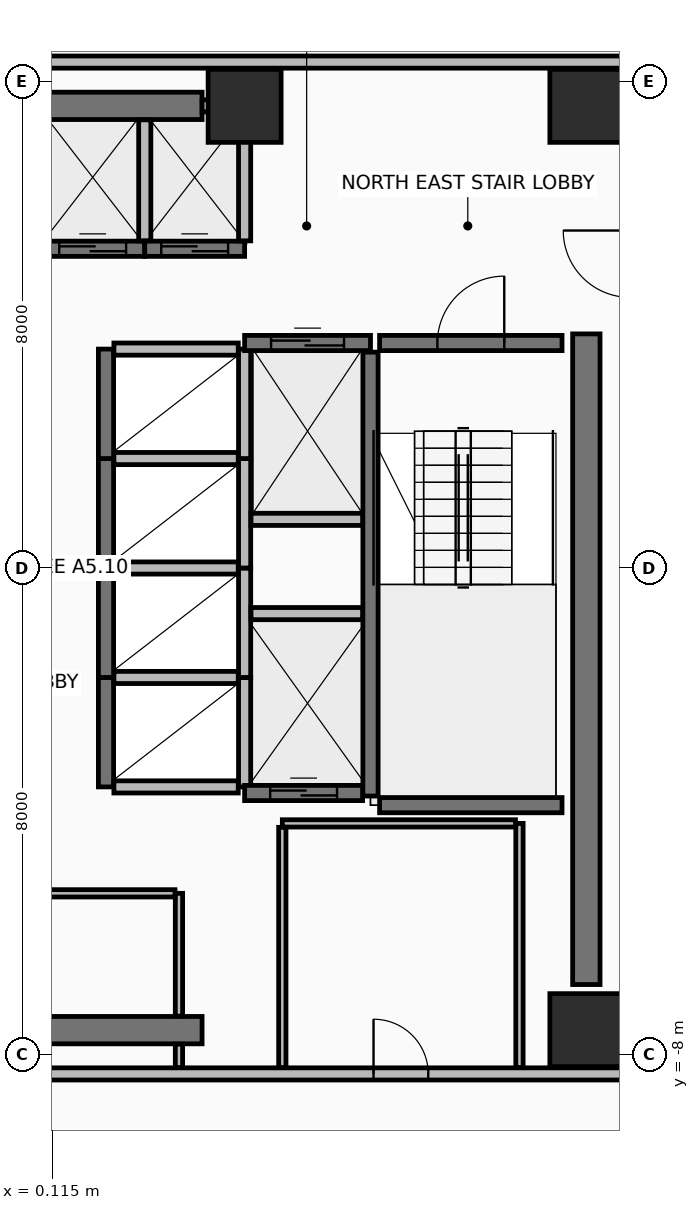
"""IFC4 building model, lengths in metres.
Left out: names, types, materials, properties, quantities, classifications, styles, units other than length and angle.
Written with IfcOpenShell. Run it as: python <this file> out.ifc"""

import sys

from ifc_helpers import new_model, si_unit, direction, frame, frame_2d, origin, origin_2d, place, context, subcontext, project, spatial, rectangle, extrude, element, fill, save


model = new_model("IFC4")
c1 = context("Model", 3, precision=1e-05, world=origin(), true_north=direction((0.0, 1.0)))
c2 = subcontext(c1, "Body", "Model", "MODEL_VIEW")
j1 = project(units=[si_unit("LENGTHUNIT", "METRE"), si_unit("PLANEANGLEUNIT", "RADIAN")], contexts=[c1])
p1 = place(None, origin())
s1 = spatial("IfcSite", under=j1, at=p1, CompositionType="ELEMENT")
p2 = place(p1, origin())
s2 = spatial("IfcBuilding", under=s1, at=p2, CompositionType="ELEMENT")
p3 = place(p2, frame((0.0, 0.0, 200.45)))
s3 = spatial("IfcBuildingStorey", under=s2, at=p3, CompositionType="ELEMENT", Elevation=200.45)
for number, where, z_axis, x_axis in (
    (1, (8.9, -7.6, 0.0), (0.0, 0.0, 1.0), (1.0, 0.0, 0.0)),
    (2, (8.9, 7.6, 0.0), (0.0, 0.0, 1.0), (1.0, 0.0, 0.0)),
    (3, (3.28, 7.6, 0.0), (0.0, 0.0, 1.0), (1.0, 0.0, 0.0)),
):
    element("IfcColumn", number, at=place(p3, frame(where, z_axis=z_axis, x_axis=x_axis)), inside=s3, PredefinedType="COLUMN", context=c2, shape_type="SweptSolid", body=[
        extrude(rectangle(XDim=1.2, YDim=1.2, at=origin_2d()), origin(), (0.0, 0.0, 1.0), 3.6),
    ])
for number, where, z_axis, x_axis in (
    (4, (-2.8, -7.6, 0.0), (0.0, 0.0, 1.0), (1.0, 0.0, 0.0)),
    (5, (-2.8, 7.6, 0.0), (0.0, 0.0, 1.0), (1.0, 0.0, 0.0)),
):
    element("IfcWall", number, at=place(p3, frame(where, z_axis=z_axis, x_axis=x_axis)), inside=s3, PredefinedType="SHEAR", context=c2, shape_type="SweptSolid", body=[
        extrude(rectangle(XDim=5.38, YDim=0.45, at=frame_2d((2.69, 0.0))), origin(), (0.0, 0.0, 1.0), 3.42),
    ])
p4 = place(p3, frame((8.9, -6.85, 0.0), z_axis=(0.0, 0.0, 1.0), x_axis=(0.0, 1.0, 0.0)))
e6 = element("IfcWall", 6, at=p4, inside=s3, PredefinedType="SHEAR", context=c2, shape_type="SweptSolid", body=[
    extrude(rectangle(XDim=10.7, YDim=0.45, at=frame_2d((5.35, 0.0))), origin(), (0.0, 0.0, 1.0), 3.42),
])
p5 = place(p3, frame((-9.62, -8.32, 0.0), z_axis=(0.0, 0.0, 1.0), x_axis=(1.0, 0.0, 0.0)))
e7 = element("IfcWall", 7, at=p5, inside=s3, PredefinedType="PARTITIONING", context=c2, shape_type="SweptSolid", body=[
    extrude(rectangle(XDim=19.24, YDim=0.2, at=frame_2d((9.62, 0.0))), origin(), (0.0, 0.0, 1.0), 2.865),
])
p6 = place(p5, frame((8.57, 0.0, 0.0)))
e8 = element("IfcOpeningElement", 8, at=p6, cuts=e7, PredefinedType="OPENING", context=c2, shape_type="SweptSolid", body=[
    extrude(rectangle(XDim=0.9, YDim=2.1, at=frame_2d((0.45, 1.05))), frame((0.0, 0.11, 0.0), z_axis=(0.0, -1.0, 0.0), x_axis=(1.0, 0.0, 0.0)), (0.0, 0.0, 1.0), 0.22),
])
p7 = place(p5, frame((15.02, 0.0, 0.0)))
e9 = element("IfcOpeningElement", 9, at=p7, cuts=e7, PredefinedType="OPENING", context=c2, shape_type="SweptSolid", body=[
    extrude(rectangle(XDim=0.9, YDim=2.1, at=frame_2d((0.45, 1.05))), frame((0.0, 0.11, 0.0), z_axis=(0.0, -1.0, 0.0), x_axis=(1.0, 0.0, 0.0)), (0.0, 0.0, 1.0), 0.22),
])
p8 = place(p3, frame((9.62, 8.32, 0.0), z_axis=(0.0, 0.0, 1.0), x_axis=(-1.0, 0.0, 0.0)))
e10 = element("IfcWall", 10, at=p8, inside=s3, PredefinedType="PARTITIONING", context=c2, shape_type="SweptSolid", body=[
    extrude(rectangle(XDim=19.24, YDim=0.2, at=frame_2d((9.62, 0.0))), origin(), (0.0, 0.0, 1.0), 2.865),
])
p9 = place(p8, frame((14.22, 0.0, 0.0)))
e11 = element("IfcOpeningElement", 11, at=p9, cuts=e10, PredefinedType="OPENING", context=c2, shape_type="SweptSolid", body=[
    extrude(rectangle(XDim=0.9, YDim=2.1, at=frame_2d((0.45, 1.05))), frame((0.0, 0.11, 0.0), z_axis=(0.0, -1.0, 0.0), x_axis=(1.0, 0.0, 0.0)), (0.0, 0.0, 1.0), 0.22),
])
p10 = place(p3, frame((5.35, -3.75, 0.0), z_axis=(0.0, 0.0, 1.0), x_axis=(0.0, 1.0, 0.0)))
e12 = element("IfcWall", 12, at=p10, inside=s3, PredefinedType="SHEAR", context=c2, shape_type="SweptSolid", body=[
    extrude(rectangle(XDim=7.3, YDim=0.25, at=frame_2d((3.65, 0.0))), origin(), (0.0, 0.0, 1.0), 3.42),
])
p11 = place(p3, frame((5.5, 3.7, 0.0), z_axis=(0.0, 0.0, 1.0), x_axis=(1.0, 0.0, 0.0)))
e13 = element("IfcWall", 13, at=p11, inside=s3, PredefinedType="SHEAR", context=c2, shape_type="SweptSolid", body=[
    extrude(rectangle(XDim=3.0, YDim=0.25, at=frame_2d((1.5, 0.0))), origin(), (0.0, 0.0, 1.0), 3.42),
])
p12 = place(p11, frame((0.95, 0.0, 0.0)))
e14 = element("IfcOpeningElement", 14, at=p12, cuts=e13, PredefinedType="OPENING", context=c2, shape_type="SweptSolid", body=[
    extrude(rectangle(XDim=1.1, YDim=2.15, at=frame_2d((0.55, 1.075))), frame((0.0, 0.135, 0.0), z_axis=(0.0, -1.0, 0.0), x_axis=(1.0, 0.0, 0.0)), (0.0, 0.0, 1.0), 0.27),
])
p13 = place(p3, frame((5.5, -3.9, 0.0), z_axis=(0.0, 0.0, 1.0), x_axis=(1.0, 0.0, 0.0)))
e15 = element("IfcWall", 15, at=p13, inside=s3, PredefinedType="SHEAR", context=c2, shape_type="SweptSolid", body=[
    extrude(rectangle(XDim=3.0, YDim=0.25, at=frame_2d((1.5, 0.0))), origin(), (0.0, 0.0, 1.0), 3.42),
])
p14 = place(p3, frame((-0.075, 5.25, 0.0), z_axis=(0.0, 0.0, 1.0), x_axis=(1.0, 0.0, 0.0)))
e16 = element("IfcWall", 16, at=p14, inside=s3, PredefinedType="SHEAR", context=c2, shape_type="SweptSolid", body=[
    extrude(rectangle(XDim=1.712, YDim=0.25, at=frame_2d((0.856, 0.0))), origin(), (0.0, 0.0, 1.0), 3.42),
])
p15 = place(p14, frame((0.306, 0.0, 0.0)))
e17 = element("IfcOpeningElement", 17, at=p15, cuts=e16, PredefinedType="OPENING", context=c2, shape_type="SweptSolid", body=[
    extrude(rectangle(XDim=1.1, YDim=2.2, at=frame_2d((0.55, 1.1))), frame((0.0, 0.135, 0.0), z_axis=(0.0, -1.0, 0.0), x_axis=(1.0, 0.0, 0.0)), (0.0, 0.0, 1.0), 0.27),
])
p16 = place(p3, frame((1.637, 5.38, 0.0), z_axis=(0.0, 0.0, 1.0), x_axis=(0.0, 1.0, 0.0)))
e18 = element("IfcWall", 18, at=p16, inside=s3, PredefinedType="PARTITIONING", context=c2, shape_type="SweptSolid", body=[
    extrude(rectangle(XDim=1.99, YDim=0.2, at=frame_2d((0.995, 0.0))), origin(), (0.0, 0.0, 1.0), 2.715),
])
p17 = place(p3, frame((1.637, 5.25, 0.0), z_axis=(0.0, 0.0, 1.0), x_axis=(1.0, 0.0, 0.0)))
e19 = element("IfcWall", 19, at=p17, inside=s3, PredefinedType="SHEAR", context=c2, shape_type="SweptSolid", body=[
    extrude(rectangle(XDim=1.643, YDim=0.25, at=frame_2d((0.821, 0.0))), origin(), (0.0, 0.0, 1.0), 3.42),
])
p18 = place(p17, frame((0.271, 0.0, 0.0)))
e20 = element("IfcOpeningElement", 20, at=p18, cuts=e19, PredefinedType="OPENING", context=c2, shape_type="SweptSolid", body=[
    extrude(rectangle(XDim=1.1, YDim=2.2, at=frame_2d((0.55, 1.1))), frame((0.0, 0.135, 0.0), z_axis=(0.0, -1.0, 0.0), x_axis=(1.0, 0.0, 0.0)), (0.0, 0.0, 1.0), 0.27),
])
p19 = place(p3, frame((2.58, 7.6, 0.0), z_axis=(0.0, 0.0, 1.0), x_axis=(1.0, 0.0, 0.0)))
e21 = element("IfcWall", 21, at=p19, inside=s3, PredefinedType="PARTITIONING", context=c2, shape_type="SweptSolid", body=[
    extrude(rectangle(XDim=0.7, YDim=0.2, at=frame_2d((0.35, 0.0))), origin(), (0.0, 0.0, 1.0), 2.715),
])
p20 = place(p3, frame((3.28, 5.38, 0.0), z_axis=(0.0, 0.0, 1.0), x_axis=(0.0, 1.0, 0.0)))
e22 = element("IfcWall", 22, at=p20, inside=s3, PredefinedType="PARTITIONING", context=c2, shape_type="SweptSolid", body=[
    extrude(rectangle(XDim=2.115, YDim=0.2, at=frame_2d((1.058, 0.0))), origin(), (0.0, 0.0, 1.0), 2.715),
])
p21 = place(p3, frame((1.0, -3.6, 0.0), z_axis=(0.0, 0.0, 1.0), x_axis=(0.0, 1.0, 0.0)))
e23 = element("IfcWall", 23, at=p21, inside=s3, PredefinedType="SHEAR", context=c2, shape_type="SweptSolid", body=[
    extrude(rectangle(XDim=1.8, YDim=0.25, at=frame_2d((0.9, 0.0))), origin(), (0.0, 0.0, 1.0), 3.42),
])
p22 = place(p3, frame((3.28, -3.6, 0.0), z_axis=(0.0, 0.0, 1.0), x_axis=(0.0, 1.0, 0.0)))
e24 = element("IfcWall", 24, at=p22, inside=s3, PredefinedType="PARTITIONING", context=c2, shape_type="SweptSolid", body=[
    extrude(rectangle(XDim=1.8, YDim=0.2, at=frame_2d((0.9, 0.0))), origin(), (0.0, 0.0, 1.0), 3.42),
])
for number, where, z_axis, x_axis in (
    (25, (1.13, -3.6, 0.0), (0.0, 0.0, 1.0), (1.0, 0.0, 0.0)),
    (26, (1.13, -1.8, 0.0), (0.0, 0.0, 1.0), (1.0, 0.0, 0.0)),
):
    element("IfcWall", number, at=place(p3, frame(where, z_axis=z_axis, x_axis=x_axis)), inside=s3, PredefinedType="PARTITIONING", context=c2, shape_type="SweptSolid", body=[
        extrude(rectangle(XDim=2.045, YDim=0.2, at=frame_2d((1.022, 0.0))), origin(), (0.0, 0.0, 1.0), 3.42),
    ])
p23 = place(p3, frame((1.0, -1.8, 0.0), z_axis=(0.0, 0.0, 1.0), x_axis=(0.0, 1.0, 0.0)))
e27 = element("IfcWall", 27, at=p23, inside=s3, PredefinedType="SHEAR", context=c2, shape_type="SweptSolid", body=[
    extrude(rectangle(XDim=1.8, YDim=0.25, at=frame_2d((0.9, 0.0))), origin(), (0.0, 0.0, 1.0), 3.42),
])
p24 = place(p3, frame((3.28, -1.8, 0.0), z_axis=(0.0, 0.0, 1.0), x_axis=(0.0, 1.0, 0.0)))
e28 = element("IfcWall", 28, at=p24, inside=s3, PredefinedType="PARTITIONING", context=c2, shape_type="SweptSolid", body=[
    extrude(rectangle(XDim=1.8, YDim=0.2, at=frame_2d((0.9, 0.0))), origin(), (0.0, 0.0, 1.0), 3.42),
])
p25 = place(p3, frame((1.13, 0.0, 0.0), z_axis=(0.0, 0.0, 1.0), x_axis=(1.0, 0.0, 0.0)))
e29 = element("IfcWall", 29, at=p25, inside=s3, PredefinedType="PARTITIONING", context=c2, shape_type="SweptSolid", body=[
    extrude(rectangle(XDim=2.045, YDim=0.2, at=frame_2d((1.022, 0.0))), origin(), (0.0, 0.0, 1.0), 3.42),
])
p26 = place(p3, frame((1.0, 0.0, 0.0), z_axis=(0.0, 0.0, 1.0), x_axis=(0.0, 1.0, 0.0)))
e30 = element("IfcWall", 30, at=p26, inside=s3, PredefinedType="SHEAR", context=c2, shape_type="SweptSolid", body=[
    extrude(rectangle(XDim=1.8, YDim=0.25, at=frame_2d((0.9, 0.0))), origin(), (0.0, 0.0, 1.0), 3.42),
])
p27 = place(p3, frame((3.28, 0.0, 0.0), z_axis=(0.0, 0.0, 1.0), x_axis=(0.0, 1.0, 0.0)))
e31 = element("IfcWall", 31, at=p27, inside=s3, PredefinedType="PARTITIONING", context=c2, shape_type="SweptSolid", body=[
    extrude(rectangle(XDim=1.8, YDim=0.2, at=frame_2d((0.9, 0.0))), origin(), (0.0, 0.0, 1.0), 3.42),
])
p28 = place(p3, frame((1.13, 1.8, 0.0), z_axis=(0.0, 0.0, 1.0), x_axis=(1.0, 0.0, 0.0)))
e32 = element("IfcWall", 32, at=p28, inside=s3, PredefinedType="PARTITIONING", context=c2, shape_type="SweptSolid", body=[
    extrude(rectangle(XDim=2.045, YDim=0.2, at=frame_2d((1.022, 0.0))), origin(), (0.0, 0.0, 1.0), 3.42),
])
p29 = place(p3, frame((1.0, 1.8, 0.0), z_axis=(0.0, 0.0, 1.0), x_axis=(0.0, 1.0, 0.0)))
e33 = element("IfcWall", 33, at=p29, inside=s3, PredefinedType="SHEAR", context=c2, shape_type="SweptSolid", body=[
    extrude(rectangle(XDim=1.8, YDim=0.25, at=frame_2d((0.9, 0.0))), origin(), (0.0, 0.0, 1.0), 3.42),
])
p30 = place(p3, frame((3.28, 1.8, 0.0), z_axis=(0.0, 0.0, 1.0), x_axis=(0.0, 1.0, 0.0)))
e34 = element("IfcWall", 34, at=p30, inside=s3, PredefinedType="PARTITIONING", context=c2, shape_type="SweptSolid", body=[
    extrude(rectangle(XDim=1.8, YDim=0.2, at=frame_2d((0.9, 0.0))), origin(), (0.0, 0.0, 1.0), 3.42),
])
p31 = place(p3, frame((1.13, 3.6, 0.0), z_axis=(0.0, 0.0, 1.0), x_axis=(1.0, 0.0, 0.0)))
e35 = element("IfcWall", 35, at=p31, inside=s3, PredefinedType="PARTITIONING", context=c2, shape_type="SweptSolid", body=[
    extrude(rectangle(XDim=2.045, YDim=0.2, at=frame_2d((1.022, 0.0))), origin(), (0.0, 0.0, 1.0), 2.715),
])
p32 = place(p3, frame((3.28, 3.7, 0.0), z_axis=(0.0, 0.0, 1.0), x_axis=(1.0, 0.0, 0.0)))
e36 = element("IfcWall", 36, at=p32, inside=s3, PredefinedType="SHEAR", context=c2, shape_type="SweptSolid", body=[
    extrude(rectangle(XDim=2.07, YDim=0.25, at=frame_2d((1.035, 0.0))), origin(), (0.0, 0.0, 1.0), 3.42),
])
p33 = place(p32, frame((0.435, 0.0, 0.0)))
e37 = element("IfcOpeningElement", 37, at=p33, cuts=e36, PredefinedType="OPENING", context=c2, shape_type="SweptSolid", body=[
    extrude(rectangle(XDim=1.2, YDim=2.2, at=frame_2d((0.6, 1.1))), frame((0.0, 0.135, 0.0), z_axis=(0.0, -1.0, 0.0), x_axis=(1.0, 0.0, 0.0)), (0.0, 0.0, 1.0), 0.27),
])
p34 = place(p3, frame((3.385, 0.8, 0.0), z_axis=(0.0, 0.0, 1.0), x_axis=(1.0, 0.0, 0.0)))
e38 = element("IfcWall", 38, at=p34, inside=s3, PredefinedType="PARTITIONING", context=c2, shape_type="SweptSolid", body=[
    extrude(rectangle(XDim=1.835, YDim=0.2, at=frame_2d((0.917, 0.0))), origin(), (0.0, 0.0, 1.0), 3.42),
])
p35 = place(p3, frame((3.28, -3.7, 0.0), z_axis=(0.0, 0.0, 1.0), x_axis=(1.0, 0.0, 0.0)))
e39 = element("IfcWall", 39, at=p35, inside=s3, PredefinedType="SHEAR", context=c2, shape_type="SweptSolid", body=[
    extrude(rectangle(XDim=1.94, YDim=0.25, at=frame_2d((0.97, 0.0))), origin(), (0.0, 0.0, 1.0), 3.42),
])
p36 = place(p35, frame((0.42, 0.0, 0.0)))
e40 = element("IfcOpeningElement", 40, at=p36, cuts=e39, PredefinedType="OPENING", context=c2, shape_type="SweptSolid", body=[
    extrude(rectangle(XDim=1.1, YDim=2.2, at=frame_2d((0.55, 1.1))), frame((0.0, 0.135, 0.0), z_axis=(0.0, -1.0, 0.0), x_axis=(1.0, 0.0, 0.0)), (0.0, 0.0, 1.0), 0.27),
])
p37 = place(p3, frame((3.385, -0.75, 0.0), z_axis=(0.0, 0.0, 1.0), x_axis=(1.0, 0.0, 0.0)))
e41 = element("IfcWall", 41, at=p37, inside=s3, PredefinedType="PARTITIONING", context=c2, shape_type="SweptSolid", body=[
    extrude(rectangle(XDim=1.835, YDim=0.2, at=frame_2d((0.917, 0.0))), origin(), (0.0, 0.0, 1.0), 3.42),
])
p38 = place(p3, frame((2.2, -8.215, 0.0), z_axis=(0.0, 0.0, 1.0), x_axis=(0.0, 1.0, 0.0)))
e42 = element("IfcWall", 42, at=p38, inside=s3, PredefinedType="PARTITIONING", context=c2, shape_type="SweptSolid", body=[
    extrude(rectangle(XDim=0.385, YDim=0.12, at=frame_2d((0.192, 0.0))), origin(), (0.0, 0.0, 1.0), 2.715),
])
p39 = place(p3, frame((2.2, -7.37, 0.0), z_axis=(0.0, 0.0, 1.0), x_axis=(0.0, 1.0, 0.0)))
e43 = element("IfcWall", 43, at=p39, inside=s3, PredefinedType="PARTITIONING", context=c2, shape_type="SweptSolid", body=[
    extrude(rectangle(XDim=2.02, YDim=0.12, at=frame_2d((1.01, 0.0))), origin(), (0.0, 0.0, 1.0), 2.715),
])
p40 = place(p3, frame((2.135, -5.35, 0.0), z_axis=(0.0, 0.0, 1.0), x_axis=(-1.0, 0.0, 0.0)))
e44 = element("IfcWall", 44, at=p40, inside=s3, PredefinedType="PARTITIONING", context=c2, shape_type="SweptSolid", body=[
    extrude(rectangle(XDim=5.535, YDim=0.12, at=frame_2d((2.768, 0.0))), origin(), (0.0, 0.0, 1.0), 2.715),
])
p41 = place(p3, frame((7.8, -8.215, 0.0), z_axis=(0.0, 0.0, 1.0), x_axis=(0.0, 1.0, 0.0)))
e45 = element("IfcWall", 45, at=p41, inside=s3, PredefinedType="PARTITIONING", context=c2, shape_type="SweptSolid", body=[
    extrude(rectangle(XDim=4.015, YDim=0.12, at=frame_2d((2.008, 0.0))), origin(), (0.0, 0.0, 1.0), 2.715),
])
p42 = place(p3, frame((7.735, -4.2, 0.0), z_axis=(0.0, 0.0, 1.0), x_axis=(-1.0, 0.0, 0.0)))
e46 = element("IfcWall", 46, at=p42, inside=s3, PredefinedType="PARTITIONING", context=c2, shape_type="SweptSolid", body=[
    extrude(rectangle(XDim=3.835, YDim=0.12, at=frame_2d((1.917, 0.0))), origin(), (0.0, 0.0, 1.0), 3.42),
])
p43 = place(p3, frame((3.9, -4.265, 0.0), z_axis=(0.0, 0.0, 1.0), x_axis=(0.0, -1.0, 0.0)))
e47 = element("IfcWall", 47, at=p43, inside=s3, PredefinedType="PARTITIONING", context=c2, shape_type="SweptSolid", body=[
    extrude(rectangle(XDim=3.95, YDim=0.12, at=frame_2d((1.975, 0.0))), origin(), (0.0, 0.0, 1.0), 2.715),
])
p44 = place(p12, frame((1.1, 0.0, 0.0), z_axis=(0.0, 0.0, 1.0), x_axis=(-1.0, 0.0, 0.0)))
e48 = element("IfcDoor", 48, at=p44, inside=s3, OperationType="SINGLE_SWING_LEFT", PredefinedType="DOOR", context=c2, shape_type="SweptSolid", body=[
    extrude(rectangle(XDim=1.1, YDim=2.15, at=frame_2d((0.55, 1.075))), frame((0.0, 0.025, 0.0), z_axis=(0.0, -1.0, 0.0), x_axis=(1.0, 0.0, 0.0)), (0.0, 0.0, 1.0), 0.05),
])
fill(e14, e48)
p45 = place(p15, origin())
e49 = element("IfcDoor", 49, at=p45, inside=s3, OperationType="SLIDING_TO_LEFT", PredefinedType="DOOR", context=c2, shape_type="SweptSolid", body=[
    extrude(rectangle(XDim=1.1, YDim=2.2, at=frame_2d((0.55, 1.1))), frame((0.0, 0.025, 0.0), z_axis=(0.0, -1.0, 0.0), x_axis=(1.0, 0.0, 0.0)), (0.0, 0.0, 1.0), 0.05),
])
fill(e17, e49)
p46 = place(p18, origin())
e50 = element("IfcDoor", 50, at=p46, inside=s3, OperationType="SLIDING_TO_LEFT", PredefinedType="DOOR", context=c2, shape_type="SweptSolid", body=[
    extrude(rectangle(XDim=1.1, YDim=2.2, at=frame_2d((0.55, 1.1))), frame((0.0, 0.025, 0.0), z_axis=(0.0, -1.0, 0.0), x_axis=(1.0, 0.0, 0.0)), (0.0, 0.0, 1.0), 0.05),
])
fill(e20, e50)
p47 = place(p33, origin())
e51 = element("IfcDoor", 51, at=p47, inside=s3, OperationType="SLIDING_TO_RIGHT", PredefinedType="DOOR", context=c2, shape_type="SweptSolid", body=[
    extrude(rectangle(XDim=1.2, YDim=2.2, at=frame_2d((0.6, 1.1))), frame((0.0, 0.025, 0.0), z_axis=(0.0, -1.0, 0.0), x_axis=(1.0, 0.0, 0.0)), (0.0, 0.0, 1.0), 0.05),
])
fill(e37, e51)
p48 = place(p36, origin())
e52 = element("IfcDoor", 52, at=p48, inside=s3, OperationType="SLIDING_TO_LEFT", PredefinedType="DOOR", context=c2, shape_type="SweptSolid", body=[
    extrude(rectangle(XDim=1.1, YDim=2.2, at=frame_2d((0.55, 1.1))), frame((0.0, 0.025, 0.0), z_axis=(0.0, -1.0, 0.0), x_axis=(1.0, 0.0, 0.0)), (0.0, 0.0, 1.0), 0.05),
])
fill(e40, e52)
p49 = place(p7, origin())
e53 = element("IfcDoor", 53, at=p49, inside=s3, OperationType="SINGLE_SWING_LEFT", PredefinedType="DOOR", context=c2, shape_type="SweptSolid", body=[
    extrude(rectangle(XDim=0.9, YDim=2.1, at=frame_2d((0.45, 1.05))), frame((0.0, 0.025, 0.0), z_axis=(0.0, -1.0, 0.0), x_axis=(1.0, 0.0, 0.0)), (0.0, 0.0, 1.0), 0.05),
])
fill(e9, e53)
save(model, sys.argv[1])
